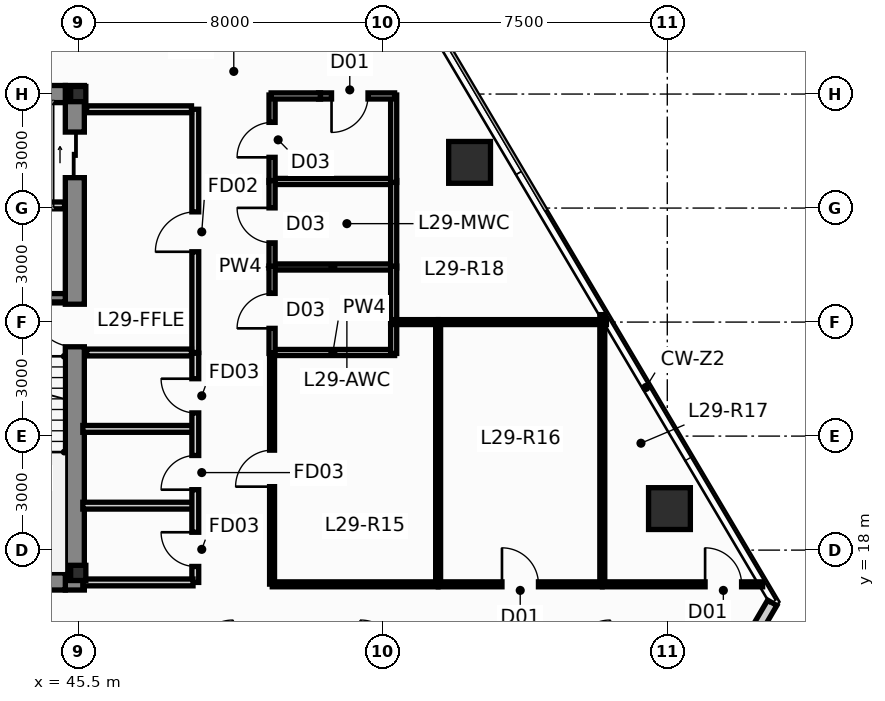
"""IFC4 building model, lengths in metres.
Left out: names, types, materials, properties, quantities, classifications, styles, units other than length and angle.
Written with IfcOpenShell. Run it as: python <this file> out.ifc"""

import sys

from ifc_helpers import new_model, si_unit, direction, frame, frame_2d, origin, origin_2d, place, context, subcontext, project, spatial, rectangle, hollow_rectangle, i_section, extrude, source, transform, mapped, element, fill, save


model = new_model("IFC4")
c1 = context("Model", 3, precision=1e-05, world=origin(), true_north=direction((0.0, 1.0)))
c2 = subcontext(c1, "Body", "Model", "MODEL_VIEW")
j1 = project(units=[si_unit("LENGTHUNIT", "METRE"), si_unit("PLANEANGLEUNIT", "RADIAN")], contexts=[c1])
p1 = place(None, origin())
s1 = spatial("IfcSite", under=j1, at=p1, CompositionType="ELEMENT")
p2 = place(p1, origin())
s2 = spatial("IfcBuilding", under=s1, at=p2, CompositionType="ELEMENT")
p3 = place(p2, frame((0.0, 0.0, 112.7)))
s3 = spatial("IfcBuildingStorey", under=s2, at=p3, CompositionType="ELEMENT", Elevation=112.7)
m1 = source(origin(), c2, "Body", "SweptSolid", [
    extrude(i_section(OverallWidth=0.4, OverallDepth=0.4, WebThickness=0.02, FlangeThickness=0.032, at=origin_2d()), origin(), (0.0, 0.0, 1.0), 3.65),
])
for number, where, z_axis, x_axis in (
    (1, (45.5, 17.4, 0.0), (0.0, 0.0, 1.0), (1.0, 0.0, 0.0)),
    (2, (45.5, 30.0, 0.0), (0.0, 0.0, 1.0), (1.0, 0.0, 0.0)),
):
    element("IfcColumn", number, at=place(p3, frame(where, z_axis=z_axis, x_axis=x_axis)), inside=s3, PredefinedType="COLUMN", context=c2, shape_type="MappedRepresentation", body=[
        mapped(m1, transform((0.0, 0.0, 0.0), scale=1.0)),
    ])
p4 = place(p3, frame((45.41, 16.95, 0.0), z_axis=(0.0, 0.0, 1.0), x_axis=(0.0, 1.0, 0.0)))
e3 = element("IfcWall", 3, at=p4, inside=s3, PredefinedType="SHEAR", context=c2, shape_type="SweptSolid", body=[
    extrude(rectangle(XDim=13.275, YDim=0.5, at=frame_2d((6.638, 0.0))), origin(), (0.0, 0.0, 1.0), 3.65),
])
p5 = place(p4, frame((6.4, 0.0, 0.0)))
e4 = element("IfcOpeningElement", 4, at=p5, cuts=e3, PredefinedType="OPENING", context=c2, shape_type="SweptSolid", body=[
    extrude(rectangle(XDim=1.12, YDim=2.15, at=frame_2d((0.56, 1.075))), frame((0.0, 0.262, 0.0), z_axis=(0.0, -1.0, 0.0), x_axis=(1.0, 0.0, 0.0)), (0.0, 0.0, 1.0), 0.524),
])
p6 = place(p4, frame((10.85, 0.0, 0.0)))
e5 = element("IfcOpeningElement", 5, at=p6, cuts=e3, PredefinedType="OPENING", context=c2, shape_type="SweptSolid", body=[
    extrude(rectangle(XDim=1.2, YDim=2.2, at=frame_2d((0.6, 1.1))), frame((0.0, 0.262, 0.0), z_axis=(0.0, -1.0, 0.0), x_axis=(1.0, 0.0, 0.0)), (0.0, 0.0, 1.0), 0.524),
])
for number, where, z_axis, x_axis in (
    (6, (42.26, 17.175, 0.0), (0.0, 0.0, 1.0), (1.0, 0.0, 0.0)),
    (7, (42.26, 30.0, 0.0), (0.0, 0.0, 1.0), (1.0, 0.0, 0.0)),
):
    element("IfcWall", number, at=place(p3, frame(where, z_axis=z_axis, x_axis=x_axis)), inside=s3, PredefinedType="SHEAR", context=c2, shape_type="SweptSolid", body=[
        extrude(rectangle(XDim=2.9, YDim=0.45, at=frame_2d((1.45, 0.0))), origin(), (0.0, 0.0, 1.0), 3.65),
    ])
p7 = place(p3, frame((42.26, 24.64, 0.0), z_axis=(0.0, 0.0, 1.0), x_axis=(1.0, 0.0, 0.0)))
e8 = element("IfcWall", 8, at=p7, inside=s3, PredefinedType="SHEAR", context=c2, shape_type="SweptSolid", body=[
    extrude(rectangle(XDim=2.9, YDim=0.22, at=frame_2d((1.45, 0.0))), origin(), (0.0, 0.0, 1.0), 3.65),
])
m2 = source(origin(), c2, "Body", "SweptSolid", [
    extrude(hollow_rectangle(XDim=1.1, YDim=1.1, WallThickness=0.06, at=origin_2d()), origin(), (0.0, 0.0, 1.0), 3.651),
])
p8 = place(p3, frame((61.057, 19.093, 0.0), z_axis=(-0.010431098089, -0.021530856313, 0.999713766245), x_axis=(0.899947055326, -0.435999194506, 0.0)))
e9 = element("IfcColumn", 9, at=p8, inside=s3, PredefinedType="COLUMN", context=c2, shape_type="MappedRepresentation", body=[
    mapped(m2, transform((0.0, 0.0, 0.0), scale=1.0)),
])
m3 = source(origin(), c2, "Body", "SweptSolid", [
    extrude(hollow_rectangle(XDim=1.1, YDim=1.1, WallThickness=0.06, at=origin_2d()), origin(), (0.0, 0.0, 1.0), 3.651),
])
p9 = place(p3, frame((55.798, 28.202, 0.0), z_axis=(-0.014912316331, -0.013775502979, 0.999793907933), x_axis=(0.678553674548, -0.734550822447, 0.0)))
e10 = element("IfcColumn", 10, at=p9, inside=s3, PredefinedType="COLUMN", context=c2, shape_type="MappedRepresentation", body=[
    mapped(m3, transform((0.0, 0.0, 0.0), scale=1.0)),
])
p10 = place(p3, frame((63.762, 16.613, 0.0), z_axis=(0.0, 0.0, 1.0), x_axis=(-0.5054939922, -0.862830124561, 0.0)))
e11 = element("IfcWall", 11, at=p10, inside=s3, PredefinedType="STANDARD", context=c2, shape_type="SweptSolid", body=[
    extrude(rectangle(XDim=13.115, YDim=0.28, at=frame_2d((6.558, 0.0))), origin(), (0.0, 0.0, 1.0), 3.4),
])
p11 = place(p10, frame((5.66, 0.0, 0.9)))
e12 = element("IfcOpeningElement", 12, at=p11, cuts=e11, PredefinedType="OPENING", context=c2, shape_type="SweptSolid", body=[
    extrude(rectangle(XDim=1.8, YDim=1.8, at=frame_2d((0.9, 0.9))), frame((0.0, 0.152, 0.0), z_axis=(0.0, -1.0, 0.0), x_axis=(1.0, 0.0, 0.0)), (0.0, 0.0, 1.0), 0.304),
])
p12 = place(p3, frame((48.58, 23.2, 0.0), z_axis=(0.0, 0.0, 1.0), x_axis=(0.0, 1.0, 0.0)))
e13 = element("IfcWall", 13, at=p12, inside=s3, PredefinedType="PARTITIONING", context=c2, shape_type="SweptSolid", body=[
    extrude(rectangle(XDim=6.4, YDim=0.18, at=frame_2d((3.2, 0.0))), origin(), (0.0, 0.0, 1.0), 3.026),
])
p13 = place(p12, frame((2.65, 0.0, 0.0)))
e14 = element("IfcOpeningElement", 14, at=p13, cuts=e13, PredefinedType="OPENING", context=c2, shape_type="SweptSolid", body=[
    extrude(rectangle(XDim=1.05, YDim=2.15, at=frame_2d((0.525, 1.075))), frame((0.0, 0.102, 0.0), z_axis=(0.0, -1.0, 0.0), x_axis=(1.0, 0.0, 0.0)), (0.0, 0.0, 1.0), 0.204),
])
p14 = place(p3, frame((45.72, 23.2, 0.0), z_axis=(0.0, 0.0, 1.0), x_axis=(1.0, 0.0, 0.0)))
e15 = element("IfcWall", 15, at=p14, inside=s3, PredefinedType="PARTITIONING", context=c2, shape_type="SweptSolid", body=[
    extrude(rectangle(XDim=2.76, YDim=0.18, at=frame_2d((1.38, 0.0))), origin(), (0.0, 0.0, 1.0), 3.4),
])
p15 = place(p3, frame((45.72, 29.6, 0.0), z_axis=(0.0, 0.0, 1.0), x_axis=(1.0, 0.0, 0.0)))
e16 = element("IfcWall", 16, at=p15, inside=s3, PredefinedType="PARTITIONING", context=c2, shape_type="SweptSolid", body=[
    extrude(rectangle(XDim=2.76, YDim=0.18, at=frame_2d((1.38, 0.0))), origin(), (0.0, 0.0, 1.0), 2.783),
])
for number, where, z_axis, x_axis in (
    (17, (42.24, 27.07, 0.0), (0.0, 0.0, 1.0), (1.0, 0.0, 0.0)),
    (18, (45.62, 19.17, 0.0), (0.0, 0.0, 1.0), (1.0, 0.0, 0.0)),
    (19, (45.62, 21.19, 0.0), (0.0, 0.0, 1.0), (1.0, 0.0, 0.0)),
):
    element("IfcWall", number, at=place(p3, frame(where, z_axis=z_axis, x_axis=x_axis)), inside=s3, PredefinedType="PARTITIONING", context=c2, shape_type="SweptSolid", body=[
        extrude(rectangle(XDim=2.9, YDim=0.18, at=frame_2d((1.45, 0.0))), origin(), (0.0, 0.0, 1.0), 3.4),
    ])
p16 = place(p3, frame((48.58, 17.15, 0.0), z_axis=(0.0, 0.0, 1.0), x_axis=(0.0, 1.0, 0.0)))
e20 = element("IfcWall", 20, at=p16, inside=s3, PredefinedType="PARTITIONING", context=c2, shape_type="SweptSolid", body=[
    extrude(rectangle(XDim=6.03, YDim=0.18, at=frame_2d((3.015, 0.0))), origin(), (0.0, 0.0, 1.0), 3.4),
])
p17 = place(p16, frame((0.42, 0.0, 0.0)))
e21 = element("IfcOpeningElement", 21, at=p17, cuts=e20, PredefinedType="OPENING", context=c2, shape_type="SweptSolid", body=[
    extrude(rectangle(XDim=0.9, YDim=2.1, at=frame_2d((0.45, 1.05))), frame((0.0, 0.102, 0.0), z_axis=(0.0, -1.0, 0.0), x_axis=(1.0, 0.0, 0.0)), (0.0, 0.0, 1.0), 0.204),
])
p18 = place(p16, frame((2.44, 0.0, 0.0)))
e22 = element("IfcOpeningElement", 22, at=p18, cuts=e20, PredefinedType="OPENING", context=c2, shape_type="SweptSolid", body=[
    extrude(rectangle(XDim=0.9, YDim=2.1, at=frame_2d((0.45, 1.05))), frame((0.0, 0.102, 0.0), z_axis=(0.0, -1.0, 0.0), x_axis=(1.0, 0.0, 0.0)), (0.0, 0.0, 1.0), 0.204),
])
p19 = place(p16, frame((4.46, 0.0, 0.0)))
e23 = element("IfcOpeningElement", 23, at=p19, cuts=e20, PredefinedType="OPENING", context=c2, shape_type="SweptSolid", body=[
    extrude(rectangle(XDim=0.9, YDim=2.1, at=frame_2d((0.45, 1.05))), frame((0.0, 0.102, 0.0), z_axis=(0.0, -1.0, 0.0), x_axis=(1.0, 0.0, 0.0)), (0.0, 0.0, 1.0), 0.204),
])
p20 = place(p3, frame((45.62, 17.15, 0.0), z_axis=(0.0, 0.0, 1.0), x_axis=(1.0, 0.0, 0.0)))
e24 = element("IfcWall", 24, at=p20, inside=s3, PredefinedType="PARTITIONING", context=c2, shape_type="SweptSolid", body=[
    extrude(rectangle(XDim=2.9, YDim=0.18, at=frame_2d((1.45, 0.0))), origin(), (0.0, 0.0, 1.0), 2.783),
])
for number, where, z_axis, x_axis in (
    (25, (50.575, 23.2, 0.0), (0.0, 0.0, 1.0), (1.0, 0.0, 0.0)),
    (26, (50.575, 25.45, 0.0), (0.0, 0.0, 1.0), (1.0, 0.0, 0.0)),
    (27, (50.575, 27.7, 0.0), (0.0, 0.0, 1.0), (1.0, 0.0, 0.0)),
):
    element("IfcWall", number, at=place(p3, frame(where, z_axis=z_axis, x_axis=x_axis)), inside=s3, PredefinedType="PLUMBINGWALL", context=c2, shape_type="SweptSolid", body=[
        extrude(rectangle(XDim=3.25, YDim=0.16, at=frame_2d((1.625, 0.0))), origin(), (0.0, 0.0, 1.0), 3.4),
    ])
p21 = place(p3, frame((50.6, 27.675, 0.0), z_axis=(0.0, 0.0, 1.0), x_axis=(0.0, 1.0, 0.0)))
e28 = element("IfcWall", 28, at=p21, inside=s3, PredefinedType="PLUMBINGWALL", context=c2, shape_type="SweptSolid", body=[
    extrude(rectangle(XDim=2.3, YDim=0.16, at=frame_2d((1.15, 0.0))), origin(), (0.0, 0.0, 1.0), 3.026),
])
p22 = place(p21, frame((0.66, 0.0, 0.0)))
e29 = element("IfcOpeningElement", 29, at=p22, cuts=e28, PredefinedType="OPENING", context=c2, shape_type="SweptSolid", body=[
    extrude(rectangle(XDim=0.92, YDim=2.1, at=frame_2d((0.46, 1.05))), frame((0.0, 0.092, 0.0), z_axis=(0.0, -1.0, 0.0), x_axis=(1.0, 0.0, 0.0)), (0.0, 0.0, 1.0), 0.184),
])
p23 = place(p3, frame((50.6, 25.425, 0.0), z_axis=(0.0, 0.0, 1.0), x_axis=(0.0, 1.0, 0.0)))
e30 = element("IfcWall", 30, at=p23, inside=s3, PredefinedType="PLUMBINGWALL", context=c2, shape_type="SweptSolid", body=[
    extrude(rectangle(XDim=2.3, YDim=0.16, at=frame_2d((1.15, 0.0))), origin(), (0.0, 0.0, 1.0), 3.026),
])
p24 = place(p23, frame((0.66, 0.0, 0.0)))
e31 = element("IfcOpeningElement", 31, at=p24, cuts=e30, PredefinedType="OPENING", context=c2, shape_type="SweptSolid", body=[
    extrude(rectangle(XDim=0.92, YDim=2.1, at=frame_2d((0.46, 1.05))), frame((0.0, 0.092, 0.0), z_axis=(0.0, -1.0, 0.0), x_axis=(1.0, 0.0, 0.0)), (0.0, 0.0, 1.0), 0.184),
])
p25 = place(p3, frame((50.6, 23.175, 0.0), z_axis=(0.0, 0.0, 1.0), x_axis=(0.0, 1.0, 0.0)))
e32 = element("IfcWall", 32, at=p25, inside=s3, PredefinedType="PLUMBINGWALL", context=c2, shape_type="SweptSolid", body=[
    extrude(rectangle(XDim=2.3, YDim=0.16, at=frame_2d((1.15, 0.0))), origin(), (0.0, 0.0, 1.0), 3.026),
])
p26 = place(p25, frame((0.66, 0.0, 0.0)))
e33 = element("IfcOpeningElement", 33, at=p26, cuts=e32, PredefinedType="OPENING", context=c2, shape_type="SweptSolid", body=[
    extrude(rectangle(XDim=0.92, YDim=2.1, at=frame_2d((0.46, 1.05))), frame((0.0, 0.092, 0.0), z_axis=(0.0, -1.0, 0.0), x_axis=(1.0, 0.0, 0.0)), (0.0, 0.0, 1.0), 0.184),
])
p27 = place(p3, frame((53.8, 25.425, 0.0), z_axis=(0.0, 0.0, 1.0), x_axis=(0.0, 1.0, 0.0)))
e34 = element("IfcWall", 34, at=p27, inside=s3, PredefinedType="PLUMBINGWALL", context=c2, shape_type="SweptSolid", body=[
    extrude(rectangle(XDim=2.3, YDim=0.16, at=frame_2d((1.15, 0.0))), origin(), (0.0, 0.0, 1.0), 3.026),
])
p28 = place(p3, frame((53.8, 27.675, 0.0), z_axis=(0.0, 0.0, 1.0), x_axis=(0.0, 1.0, 0.0)))
e35 = element("IfcWall", 35, at=p28, inside=s3, PredefinedType="PLUMBINGWALL", context=c2, shape_type="SweptSolid", body=[
    extrude(rectangle(XDim=2.3, YDim=0.16, at=frame_2d((1.15, 0.0))), origin(), (0.0, 0.0, 1.0), 3.4),
])
p29 = place(p3, frame((53.825, 29.95, 0.0), z_axis=(0.0, 0.0, 1.0), x_axis=(-1.0, 0.0, 0.0)))
e36 = element("IfcWall", 36, at=p29, inside=s3, PredefinedType="PLUMBINGWALL", context=c2, shape_type="SweptSolid", body=[
    extrude(rectangle(XDim=2.0, YDim=0.16, at=frame_2d((1.0, 0.0))), origin(), (0.0, 0.0, 1.0), 3.4),
])
p30 = place(p29, frame((0.7, 0.0, 0.0)))
e37 = element("IfcOpeningElement", 37, at=p30, cuts=e36, PredefinedType="OPENING", context=c2, shape_type="SweptSolid", body=[
    extrude(rectangle(XDim=0.96, YDim=2.15, at=frame_2d((0.48, 1.075))), frame((0.0, 0.092, 0.0), z_axis=(0.0, -1.0, 0.0), x_axis=(1.0, 0.0, 0.0)), (0.0, 0.0, 1.0), 0.184),
])
p31 = place(p3, frame((53.8, 23.975, 0.0), z_axis=(0.0, 0.0, 1.0), x_axis=(0.0, 1.0, 0.0)))
e38 = element("IfcWall", 38, at=p31, inside=s3, PredefinedType="PLUMBINGWALL", context=c2, shape_type="SweptSolid", body=[
    extrude(rectangle(XDim=1.5, YDim=0.16, at=frame_2d((0.75, 0.0))), origin(), (0.0, 0.0, 1.0), 3.026),
])
p32 = place(p3, frame((50.575, 29.95, 0.0), z_axis=(0.0, 0.0, 1.0), x_axis=(1.0, 0.0, 0.0)))
e39 = element("IfcWall", 39, at=p32, inside=s3, PredefinedType="PLUMBINGWALL", context=c2, shape_type="SweptSolid", body=[
    extrude(rectangle(XDim=1.3, YDim=0.16, at=frame_2d((0.65, 0.0))), origin(), (0.0, 0.0, 1.0), 3.4),
])
p33 = place(p3, frame((53.8, 23.175, 0.0), z_axis=(0.0, 0.0, 1.0), x_axis=(0.0, 1.0, 0.0)))
e40 = element("IfcWall", 40, at=p33, inside=s3, PredefinedType="PLUMBINGWALL", context=c2, shape_type="SweptSolid", body=[
    extrude(rectangle(XDim=0.85, YDim=0.16, at=frame_2d((0.425, 0.0))), origin(), (0.0, 0.0, 1.0), 3.4),
])
p34 = place(p3, frame((54.97, 17.105, 0.0), z_axis=(0.0, 0.0, 1.0), x_axis=(0.0, 1.0, 0.0)))
e41 = element("IfcWall", 41, at=p34, inside=s3, PredefinedType="PARTITIONING", context=c2, shape_type="SweptSolid", body=[
    extrude(rectangle(XDim=6.89, YDim=0.13, at=frame_2d((3.445, 0.0))), origin(), (0.0, 0.0, 1.0), 3.026),
])
p35 = place(p3, frame((59.29, 17.105, 0.0), z_axis=(0.0, 0.0, 1.0), x_axis=(0.0, 1.0, 0.0)))
e42 = element("IfcWall", 42, at=p35, inside=s3, PredefinedType="PARTITIONING", context=c2, shape_type="SweptSolid", body=[
    extrude(rectangle(XDim=7.091, YDim=0.13, at=frame_2d((3.546, 0.0))), origin(), (0.0, 0.0, 1.0), 3.4),
])
p36 = place(p3, frame((50.6, 17.105, 0.0), z_axis=(0.0, 0.0, 1.0), x_axis=(0.0, 1.0, 0.0)))
e43 = element("IfcWall", 43, at=p36, inside=s3, PredefinedType="PARTITIONING", context=c2, shape_type="SweptSolid", body=[
    extrude(rectangle(XDim=6.09, YDim=0.13, at=frame_2d((3.045, 0.0))), origin(), (0.0, 0.0, 1.0), 3.026),
])
p37 = place(p36, frame((2.565, 0.0, 0.0)))
e44 = element("IfcOpeningElement", 44, at=p37, cuts=e43, PredefinedType="OPENING", context=c2, shape_type="SweptSolid", body=[
    extrude(rectangle(XDim=0.96, YDim=2.15, at=frame_2d((0.48, 1.075))), frame((0.0, 0.077, 0.0), z_axis=(0.0, -1.0, 0.0), x_axis=(1.0, 0.0, 0.0)), (0.0, 0.0, 1.0), 0.154),
])
p38 = place(p3, frame((54.965, 17.1, 0.0), z_axis=(0.0, 0.0, 1.0), x_axis=(-1.0, 0.0, 0.0)))
e45 = element("IfcWall", 45, at=p38, inside=s3, PredefinedType="PARTITIONING", context=c2, shape_type="SweptSolid", body=[
    extrude(rectangle(XDim=4.36, YDim=0.13, at=frame_2d((2.18, 0.0))), origin(), (0.0, 0.0, 1.0), 3.4),
])
p39 = place(p3, frame((59.295, 17.1, 0.0), z_axis=(0.0, 0.0, 1.0), x_axis=(1.0, 0.0, 0.0)))
e46 = element("IfcWall", 46, at=p39, inside=s3, PredefinedType="PARTITIONING", context=c2, shape_type="SweptSolid", body=[
    extrude(rectangle(XDim=4.215, YDim=0.13, at=frame_2d((2.107, 0.0))), origin(), (0.0, 0.0, 1.0), 3.4),
])
p40 = place(p39, frame((2.7, 0.0, 0.0)))
e47 = element("IfcOpeningElement", 47, at=p40, cuts=e46, PredefinedType="OPENING", context=c2, shape_type="SweptSolid", body=[
    extrude(rectangle(XDim=0.96, YDim=2.15, at=frame_2d((0.48, 1.075))), frame((0.0, 0.077, 0.0), z_axis=(0.0, -1.0, 0.0), x_axis=(1.0, 0.0, 0.0)), (0.0, 0.0, 1.0), 0.154),
])
p41 = place(p3, frame((54.975, 17.1, 0.0), z_axis=(0.0, 0.0, 1.0), x_axis=(1.0, 0.0, 0.0)))
e48 = element("IfcWall", 48, at=p41, inside=s3, PredefinedType="PARTITIONING", context=c2, shape_type="SweptSolid", body=[
    extrude(rectangle(XDim=4.31, YDim=0.13, at=frame_2d((2.155, 0.0))), origin(), (0.0, 0.0, 1.0), 3.4),
])
p42 = place(p41, frame((1.675, 0.0, 0.0)))
e49 = element("IfcOpeningElement", 49, at=p42, cuts=e48, PredefinedType="OPENING", context=c2, shape_type="SweptSolid", body=[
    extrude(rectangle(XDim=0.96, YDim=2.15, at=frame_2d((0.48, 1.075))), frame((0.0, 0.077, 0.0), z_axis=(0.0, -1.0, 0.0), x_axis=(1.0, 0.0, 0.0)), (0.0, 0.0, 1.0), 0.154),
])
p43 = place(p3, frame((54.975, 24.0, 0.0), z_axis=(0.0, 0.0, 1.0), x_axis=(1.0, 0.0, 0.0)))
e50 = element("IfcWall", 50, at=p43, inside=s3, PredefinedType="PARTITIONING", context=c2, shape_type="SweptSolid", body=[
    extrude(rectangle(XDim=4.423, YDim=0.13, at=frame_2d((2.211, 0.0))), origin(), (0.0, 0.0, 1.0), 3.4),
])
p44 = place(p3, frame((53.805, 24.0, 0.0), z_axis=(0.0, 0.0, 1.0), x_axis=(1.0, 0.0, 0.0)))
e51 = element("IfcWall", 51, at=p44, inside=s3, PredefinedType="PARTITIONING", context=c2, shape_type="SweptSolid", body=[
    extrude(rectangle(XDim=1.16, YDim=0.13, at=frame_2d((0.58, 0.0))), origin(), (0.0, 0.0, 1.0), 3.4),
])
p45 = place(p5, origin())
e52 = element("IfcDoor", 52, at=p45, inside=s3, OperationType="SINGLE_SWING_RIGHT", PredefinedType="DOOR", context=c2, shape_type="SweptSolid", body=[
    extrude(rectangle(XDim=1.12, YDim=2.15, at=frame_2d((0.56, 1.075))), frame((0.0, 0.025, 0.0), z_axis=(0.0, -1.0, 0.0), x_axis=(1.0, 0.0, 0.0)), (0.0, 0.0, 1.0), 0.05),
])
fill(e4, e52)
p46 = place(p6, origin())
e53 = element("IfcDoor", 53, at=p46, inside=s3, OperationType="SLIDING_TO_RIGHT", PredefinedType="DOOR", context=c2, shape_type="SweptSolid", body=[
    extrude(rectangle(XDim=1.2, YDim=2.2, at=frame_2d((0.6, 1.1))), frame((0.0, 0.025, 0.0), z_axis=(0.0, -1.0, 0.0), x_axis=(1.0, 0.0, 0.0)), (0.0, 0.0, 1.0), 0.05),
])
fill(e5, e53)
p47 = place(p13, origin())
e54 = element("IfcDoor", 54, at=p47, inside=s3, OperationType="SINGLE_SWING_LEFT", PredefinedType="DOOR", context=c2, shape_type="SweptSolid", body=[
    extrude(rectangle(XDim=1.05, YDim=2.15, at=frame_2d((0.525, 1.075))), frame((0.0, 0.025, 0.0), z_axis=(0.0, -1.0, 0.0), x_axis=(1.0, 0.0, 0.0)), (0.0, 0.0, 1.0), 0.05),
])
fill(e14, e54)
p48 = place(p17, origin())
e55 = element("IfcDoor", 55, at=p48, inside=s3, OperationType="SINGLE_SWING_RIGHT", PredefinedType="DOOR", context=c2, shape_type="SweptSolid", body=[
    extrude(rectangle(XDim=0.9, YDim=2.1, at=frame_2d((0.45, 1.05))), frame((0.0, 0.025, 0.0), z_axis=(0.0, -1.0, 0.0), x_axis=(1.0, 0.0, 0.0)), (0.0, 0.0, 1.0), 0.05),
])
fill(e21, e55)
p49 = place(p18, origin())
e56 = element("IfcDoor", 56, at=p49, inside=s3, OperationType="SINGLE_SWING_LEFT", PredefinedType="DOOR", context=c2, shape_type="SweptSolid", body=[
    extrude(rectangle(XDim=0.9, YDim=2.1, at=frame_2d((0.45, 1.05))), frame((0.0, 0.025, 0.0), z_axis=(0.0, -1.0, 0.0), x_axis=(1.0, 0.0, 0.0)), (0.0, 0.0, 1.0), 0.05),
])
fill(e22, e56)
p50 = place(p19, origin())
e57 = element("IfcDoor", 57, at=p50, inside=s3, OperationType="SINGLE_SWING_RIGHT", PredefinedType="DOOR", context=c2, shape_type="SweptSolid", body=[
    extrude(rectangle(XDim=0.9, YDim=2.1, at=frame_2d((0.45, 1.05))), frame((0.0, 0.025, 0.0), z_axis=(0.0, -1.0, 0.0), x_axis=(1.0, 0.0, 0.0)), (0.0, 0.0, 1.0), 0.05),
])
fill(e23, e57)
p51 = place(p22, origin())
e58 = element("IfcDoor", 58, at=p51, inside=s3, OperationType="SINGLE_SWING_LEFT", PredefinedType="DOOR", context=c2, shape_type="SweptSolid", body=[
    extrude(rectangle(XDim=0.92, YDim=2.1, at=frame_2d((0.46, 1.05))), frame((0.0, 0.025, 0.0), z_axis=(0.0, -1.0, 0.0), x_axis=(1.0, 0.0, 0.0)), (0.0, 0.0, 1.0), 0.05),
])
fill(e29, e58)
p52 = place(p24, origin())
e59 = element("IfcDoor", 59, at=p52, inside=s3, OperationType="SINGLE_SWING_RIGHT", PredefinedType="DOOR", context=c2, shape_type="SweptSolid", body=[
    extrude(rectangle(XDim=0.92, YDim=2.1, at=frame_2d((0.46, 1.05))), frame((0.0, 0.025, 0.0), z_axis=(0.0, -1.0, 0.0), x_axis=(1.0, 0.0, 0.0)), (0.0, 0.0, 1.0), 0.05),
])
fill(e31, e59)
p53 = place(p26, origin())
e60 = element("IfcDoor", 60, at=p53, inside=s3, OperationType="SINGLE_SWING_LEFT", PredefinedType="DOOR", context=c2, shape_type="SweptSolid", body=[
    extrude(rectangle(XDim=0.92, YDim=2.1, at=frame_2d((0.46, 1.05))), frame((0.0, 0.025, 0.0), z_axis=(0.0, -1.0, 0.0), x_axis=(1.0, 0.0, 0.0)), (0.0, 0.0, 1.0), 0.05),
])
fill(e33, e60)
p54 = place(p37, origin())
e61 = element("IfcDoor", 61, at=p54, inside=s3, OperationType="SINGLE_SWING_LEFT", PredefinedType="DOOR", context=c2, shape_type="SweptSolid", body=[
    extrude(rectangle(XDim=0.96, YDim=2.15, at=frame_2d((0.48, 1.075))), frame((0.0, 0.025, 0.0), z_axis=(0.0, -1.0, 0.0), x_axis=(1.0, 0.0, 0.0)), (0.0, 0.0, 1.0), 0.05),
])
fill(e44, e61)
p55 = place(p40, origin())
e62 = element("IfcDoor", 62, at=p55, inside=s3, OperationType="SINGLE_SWING_LEFT", PredefinedType="DOOR", context=c2, shape_type="SweptSolid", body=[
    extrude(rectangle(XDim=0.96, YDim=2.15, at=frame_2d((0.48, 1.075))), frame((0.0, 0.025, 0.0), z_axis=(0.0, -1.0, 0.0), x_axis=(1.0, 0.0, 0.0)), (0.0, 0.0, 1.0), 0.05),
])
fill(e47, e62)
p56 = place(p42, origin())
e63 = element("IfcDoor", 63, at=p56, inside=s3, OperationType="SINGLE_SWING_LEFT", PredefinedType="DOOR", context=c2, shape_type="SweptSolid", body=[
    extrude(rectangle(XDim=0.96, YDim=2.15, at=frame_2d((0.48, 1.075))), frame((0.0, 0.025, 0.0), z_axis=(0.0, -1.0, 0.0), x_axis=(1.0, 0.0, 0.0)), (0.0, 0.0, 1.0), 0.05),
])
fill(e49, e63)
p57 = place(p30, origin())
e64 = element("IfcDoor", 64, at=p57, inside=s3, OperationType="SINGLE_SWING_RIGHT", PredefinedType="DOOR", context=c2, shape_type="SweptSolid", body=[
    extrude(rectangle(XDim=0.96, YDim=2.15, at=frame_2d((0.48, 1.075))), frame((0.0, 0.025, 0.0), z_axis=(0.0, -1.0, 0.0), x_axis=(1.0, 0.0, 0.0)), (0.0, 0.0, 1.0), 0.05),
])
fill(e37, e64)
save(model, sys.argv[1])
